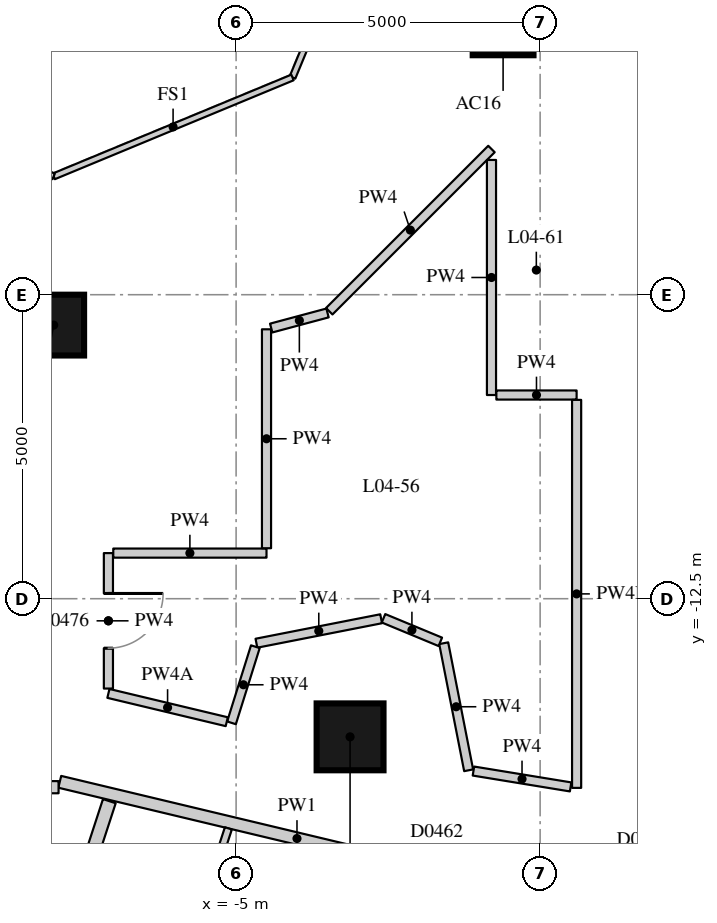
"""IFC4 building model, lengths in metres.
Left out: names, types, materials, properties, quantities, classifications, styles, units other than length and angle.
Written with IfcOpenShell. Run it as: python <this file> out.ifc"""

import sys

from ifc_helpers import new_model, si_unit, direction, frame, frame_2d, origin, origin_2d, place, context, subcontext, project, spatial, rectangle, extrude, element, fill, save


model = new_model("IFC4")
c1 = context("Model", 3, precision=1e-05, world=origin(), true_north=direction((0.0, 1.0)))
c2 = subcontext(c1, "Body", "Model", "MODEL_VIEW")
j1 = project(units=[si_unit("LENGTHUNIT", "METRE"), si_unit("PLANEANGLEUNIT", "RADIAN")], contexts=[c1])
p1 = place(None, origin())
s1 = spatial("IfcSite", under=j1, at=p1, CompositionType="ELEMENT")
p2 = place(p1, origin())
s2 = spatial("IfcBuilding", under=s1, at=p2, CompositionType="ELEMENT")
p3 = place(p2, frame((0.0, 0.0, 21.7)))
s3 = spatial("IfcBuildingStorey", under=s2, at=p3, CompositionType="ELEMENT", Elevation=21.7)
for number, where, z_axis, x_axis in (
    (1, (-8.0, -8.0, 0.0), (0.0, 0.0, 1.0), (1.0, 0.0, 0.0)),
    (2, (-0.609, -3.062, 0.0), (0.0, 0.0, 1.0), (1.0, 0.0, 0.0)),
):
    element("IfcColumn", number, at=place(p3, frame(where, z_axis=z_axis, x_axis=x_axis)), inside=s3, PredefinedType="COLUMN", context=c2, shape_type="SweptSolid", body=[
        extrude(rectangle(XDim=1.0, YDim=1.0, at=origin_2d()), origin(), (0.0, 0.0, 1.0), 3.3),
    ])
p4 = place(p3, frame((-3.126, -14.772, 0.0), z_axis=(0.0, 0.0, 1.0), x_axis=(1.0, 0.0, 0.0)))
e3 = element("IfcColumn", 3, at=p4, inside=s3, PredefinedType="COLUMN", context=c2, shape_type="SweptSolid", body=[
    extrude(rectangle(XDim=1.1, YDim=1.1, at=origin_2d()), origin(), (0.0, 0.0, 1.0), 3.3),
])
p5 = place(p3, frame((10.488, -14.893, 0.0), z_axis=(0.0, 0.0, 1.0), x_axis=(-0.972603489924, -0.23247032367, 0.0)))
e4 = element("IfcWall", 4, at=p5, inside=s3, PredefinedType="PARTITIONING", context=c2, shape_type="SweptSolid", body=[
    extrude(rectangle(XDim=10.783, YDim=0.2, at=frame_2d((5.392, 0.0))), origin(), (0.0, 0.0, 1.0), 3.02),
])
p6 = place(p5, frame((8.59, 0.0, 0.0)))
e5 = element("IfcOpeningElement", 5, at=p6, cuts=e4, PredefinedType="OPENING", context=c2, shape_type="SweptSolid", body=[
    extrude(rectangle(XDim=0.9, YDim=2.1, at=frame_2d((0.45, 1.05))), frame((0.0, 0.11, 0.0), z_axis=(0.0, -1.0, 0.0), x_axis=(1.0, 0.0, 0.0)), (0.0, 0.0, 1.0), 0.22),
])
p7 = place(p5, frame((5.462, 0.0, 0.0)))
e6 = element("IfcOpeningElement", 6, at=p7, cuts=e4, PredefinedType="OPENING", context=c2, shape_type="SweptSolid", body=[
    extrude(rectangle(XDim=1.0, YDim=2.1, at=frame_2d((0.5, 1.05))), frame((0.0, 0.11, 0.0), z_axis=(0.0, -1.0, 0.0), x_axis=(1.0, 0.0, 0.0)), (0.0, 0.0, 1.0), 0.22),
])
p8 = place(p3, frame((-0.098, -17.377, 0.0), z_axis=(0.0, 0.0, 1.0), x_axis=(-0.97260043732, 0.232483094708, 0.0)))
e7 = element("IfcWall", 7, at=p8, inside=s3, PredefinedType="PARTITIONING", context=c2, shape_type="SweptSolid", body=[
    extrude(rectangle(XDim=8.022, YDim=0.2, at=frame_2d((4.011, 0.0))), origin(), (0.0, 0.0, 1.0), 3.02),
])
p9 = place(p8, frame((1.643, 0.0, 0.0)))
e8 = element("IfcOpeningElement", 8, at=p9, cuts=e7, PredefinedType="OPENING", context=c2, shape_type="SweptSolid", body=[
    extrude(rectangle(XDim=1.1, YDim=2.1, at=frame_2d((0.55, 1.05))), frame((0.0, 0.11, 0.0), z_axis=(0.0, -1.0, 0.0), x_axis=(1.0, 0.0, 0.0)), (0.0, 0.0, 1.0), 0.22),
])
p10 = place(p3, frame((-7.92, -15.6, 0.0), z_axis=(0.0, 0.0, 1.0), x_axis=(-1.0, 0.0, 0.0)))
e9 = element("IfcWall", 9, at=p10, inside=s3, PredefinedType="PARTITIONING", context=c2, shape_type="SweptSolid", body=[
    extrude(rectangle(XDim=7.672, YDim=0.2, at=frame_2d((3.836, 0.0))), origin(), (0.0, 0.0, 1.0), 3.02),
])
p11 = place(p10, frame((5.537, 0.0, 0.0)))
e10 = element("IfcOpeningElement", 10, at=p11, cuts=e9, PredefinedType="OPENING", context=c2, shape_type="SweptSolid", body=[
    extrude(rectangle(XDim=1.0, YDim=2.1, at=frame_2d((0.5, 1.05))), frame((0.0, 0.11, 0.0), z_axis=(0.0, -1.0, 0.0), x_axis=(1.0, 0.0, 0.0)), (0.0, 0.0, 1.0), 0.22),
])
p12 = place(p10, frame((1.036, 0.0, 0.0)))
e11 = element("IfcOpeningElement", 11, at=p12, cuts=e9, PredefinedType="OPENING", context=c2, shape_type="SweptSolid", body=[
    extrude(rectangle(XDim=0.9, YDim=2.1, at=frame_2d((0.45, 1.05))), frame((0.0, 0.11, 0.0), z_axis=(0.0, -1.0, 0.0), x_axis=(1.0, 0.0, 0.0)), (0.0, 0.0, 1.0), 0.22),
])
p13 = place(p3, frame((-1.176, -15.322, 0.0), z_axis=(0.0, 0.0, 1.0), x_axis=(-0.192477233237, 0.981301439256, 0.0)))
e12 = element("IfcWall", 12, at=p13, inside=s3, PredefinedType="PARTITIONING", context=c2, shape_type="SweptSolid", body=[
    extrude(rectangle(XDim=2.13, YDim=0.15, at=frame_2d((1.065, 0.0))), origin(), (0.0, 0.0, 1.0), 3.02),
])
p14 = place(p3, frame((-1.641, -13.209, 0.0), z_axis=(0.0, 0.0, 1.0), x_axis=(-0.923725449546, 0.383055209937, 0.0)))
e13 = element("IfcWall", 13, at=p14, inside=s3, PredefinedType="PARTITIONING", context=c2, shape_type="SweptSolid", body=[
    extrude(rectangle(XDim=1.011, YDim=0.15, at=frame_2d((0.506, 0.0))), origin(), (0.0, 0.0, 1.0), 3.02),
])
p15 = place(p3, frame((-2.615, -12.83, 0.0), z_axis=(0.0, 0.0, 1.0), x_axis=(-0.981297312652, -0.192498270593, 0.0)))
e14 = element("IfcWall", 14, at=p15, inside=s3, PredefinedType="PARTITIONING", context=c2, shape_type="SweptSolid", body=[
    extrude(rectangle(XDim=2.09, YDim=0.15, at=frame_2d((1.045, 0.0))), origin(), (0.0, 0.0, 1.0), 3.02),
])
p16 = place(p3, frame((-4.683, -13.289, 0.0), z_axis=(0.0, 0.0, 1.0), x_axis=(-0.298931613931, -0.954274536071, 0.0)))
e15 = element("IfcWall", 15, at=p16, inside=s3, PredefinedType="PARTITIONING", context=c2, shape_type="SweptSolid", body=[
    extrude(rectangle(XDim=1.312, YDim=0.15, at=frame_2d((0.656, 0.0))), origin(), (0.0, 0.0, 1.0), 3.02),
])
p17 = place(p3, frame((-5.154, -14.523, 0.0), z_axis=(0.0, 0.0, 1.0), x_axis=(-0.97258848944, 0.232533073366, 0.0)))
e16 = element("IfcWall", 16, at=p17, inside=s3, PredefinedType="PARTITIONING", context=c2, shape_type="SweptSolid", body=[
    extrude(rectangle(XDim=2.001, YDim=0.15, at=frame_2d((1.0, 0.0))), origin(), (0.0, 0.0, 1.0), 2.57),
])
p18 = place(p3, frame((-7.1, -13.978, 0.0), z_axis=(0.0, 0.0, 1.0), x_axis=(0.0, 1.0, 0.0)))
e17 = element("IfcWall", 17, at=p18, inside=s3, PredefinedType="PARTITIONING", context=c2, shape_type="SweptSolid", body=[
    extrude(rectangle(XDim=2.228, YDim=0.15, at=frame_2d((1.114, 0.0))), origin(), (0.0, 0.0, 1.0), 3.02),
])
p19 = place(p18, frame((0.664, 0.0, 0.0)))
e18 = element("IfcOpeningElement", 18, at=p19, cuts=e17, PredefinedType="OPENING", context=c2, shape_type="SweptSolid", body=[
    extrude(rectangle(XDim=0.9, YDim=2.1, at=frame_2d((0.45, 1.05))), frame((0.0, 0.085, 0.0), z_axis=(0.0, -1.0, 0.0), x_axis=(1.0, 0.0, 0.0)), (0.0, 0.0, 1.0), 0.17),
])
p20 = place(p3, frame((-7.02, -11.75, 0.0), z_axis=(0.0, 0.0, 1.0), x_axis=(1.0, 0.0, 0.0)))
e19 = element("IfcWall", 19, at=p20, inside=s3, PredefinedType="PARTITIONING", context=c2, shape_type="SweptSolid", body=[
    extrude(rectangle(XDim=2.52, YDim=0.15, at=frame_2d((1.26, 0.0))), origin(), (0.0, 0.0, 1.0), 3.02),
])
p21 = place(p3, frame((-4.5, -11.67, 0.0), z_axis=(0.0, 0.0, 1.0), x_axis=(0.0, 1.0, 0.0)))
e20 = element("IfcWall", 20, at=p21, inside=s3, PredefinedType="PARTITIONING", context=c2, shape_type="SweptSolid", body=[
    extrude(rectangle(XDim=3.601, YDim=0.15, at=frame_2d((1.8, 0.0))), origin(), (0.0, 0.0, 1.0), 3.02),
])
p22 = place(p3, frame((-4.423, -8.049, 0.0), z_axis=(0.0, 0.0, 1.0), x_axis=(0.96590031435, 0.25891423819, 0.0)))
e21 = element("IfcWall", 21, at=p22, inside=s3, PredefinedType="PARTITIONING", context=c2, shape_type="SweptSolid", body=[
    extrude(rectangle(XDim=0.959, YDim=0.15, at=frame_2d((0.479, 0.0))), origin(), (0.0, 0.0, 1.0), 3.02),
])
p23 = place(p3, frame((-3.468, -7.772, 0.0), z_axis=(0.0, 0.0, 1.0), x_axis=(0.707106781187, 0.707106781187, 0.0)))
e22 = element("IfcWall", 22, at=p23, inside=s3, PredefinedType="PARTITIONING", context=c2, shape_type="SweptSolid", body=[
    extrude(rectangle(XDim=3.773, YDim=0.15, at=frame_2d((1.887, 0.0))), origin(), (0.0, 0.0, 1.0), 3.02),
])
p24 = place(p3, frame((-0.8, -5.284, 0.0), z_axis=(0.0, 0.0, 1.0), x_axis=(0.0, -1.0, 0.0)))
e23 = element("IfcWall", 23, at=p24, inside=s3, PredefinedType="PARTITIONING", context=c2, shape_type="SweptSolid", body=[
    extrude(rectangle(XDim=3.866, YDim=0.15, at=frame_2d((1.933, 0.0))), origin(), (0.0, 0.0, 1.0), 3.02),
])
p25 = place(p3, frame((-0.72, -9.15, 0.0), z_axis=(0.0, 0.0, 1.0), x_axis=(1.0, 0.0, 0.0)))
e24 = element("IfcWall", 24, at=p25, inside=s3, PredefinedType="PARTITIONING", context=c2, shape_type="SweptSolid", body=[
    extrude(rectangle(XDim=1.32, YDim=0.15, at=frame_2d((0.66, 0.0))), origin(), (0.0, 0.0, 1.0), 3.02),
])
p26 = place(p3, frame((0.6, -9.23, 0.0), z_axis=(0.0, 0.0, 1.0), x_axis=(0.0, -1.0, 0.0)))
e25 = element("IfcWall", 25, at=p26, inside=s3, PredefinedType="PARTITIONING", context=c2, shape_type="SweptSolid", body=[
    extrude(rectangle(XDim=6.382, YDim=0.15, at=frame_2d((3.191, 0.0))), origin(), (0.0, 0.0, 1.0), 2.47),
])
p27 = place(p3, frame((0.501, -15.596, 0.0), z_axis=(0.0, 0.0, 1.0), x_axis=(-0.986922601781, 0.161194845119, 0.0)))
e26 = element("IfcWall", 26, at=p27, inside=s3, PredefinedType="PARTITIONING", context=c2, shape_type="SweptSolid", body=[
    extrude(rectangle(XDim=1.619, YDim=0.15, at=frame_2d((0.81, 0.0))), origin(), (0.0, 0.0, 1.0), 3.02),
])
p28 = place(p3, frame((-9.429, -23.014, 0.0), z_axis=(0.0, 0.0, 1.0), x_axis=(0.310261176215, 0.950651356983, 0.0)))
e27 = element("IfcWall", 27, at=p28, inside=s3, PredefinedType="PARTITIONING", context=c2, shape_type="SweptSolid", body=[
    extrude(rectangle(XDim=7.557, YDim=0.22, at=frame_2d((3.779, 0.0))), origin(), (0.0, 0.0, 1.0), 3.02),
])
p29 = place(p3, frame((-5.127, -16.277, 0.0), z_axis=(0.0, 0.0, 1.0), x_axis=(-0.310206676877, -0.950669142037, 0.0)))
e28 = element("IfcWall", 28, at=p29, inside=s3, PredefinedType="PARTITIONING", context=c2, shape_type="SweptSolid", body=[
    extrude(rectangle(XDim=2.862, YDim=0.12, at=frame_2d((1.431, 0.0))), origin(), (0.0, 0.0, 1.0), 3.02),
])
for number, where, z_axis, x_axis in (
    (29, (-2.446, 0.0, 0.0), (0.0, 0.0, 1.0), (-0.383, -0.924, 0.0)),
    (30, (-4.073, -3.927, 0.0), (0.0, 0.0, 1.0), (-0.924, -0.383, 0.0)),
    (31, (-8.0, -5.554, 0.0), (0.0, 0.0, 1.0), (-0.924, 0.383, 0.0)),
):
    element("IfcWall", number, at=place(p3, frame(where, z_axis=z_axis, x_axis=x_axis)), inside=s3, PredefinedType="PARTITIONING", context=c2, shape_type="SweptSolid", body=[
        extrude(rectangle(XDim=4.251, YDim=0.1, at=frame_2d((2.125, 0.0))), origin(), (0.0, 0.0, 1.0), 3.02),
    ])
p30 = place(p19, origin())
e32 = element("IfcDoor", 32, at=p30, inside=s3, OperationType="SINGLE_SWING_LEFT", PredefinedType="DOOR", context=c2, shape_type="SweptSolid", body=[
    extrude(rectangle(XDim=0.9, YDim=2.1, at=frame_2d((0.45, 1.05))), frame((0.0, 0.025, 0.0), z_axis=(0.0, -1.0, 0.0), x_axis=(1.0, 0.0, 0.0)), (0.0, 0.0, 1.0), 0.05),
])
fill(e18, e32)
save(model, sys.argv[1])
